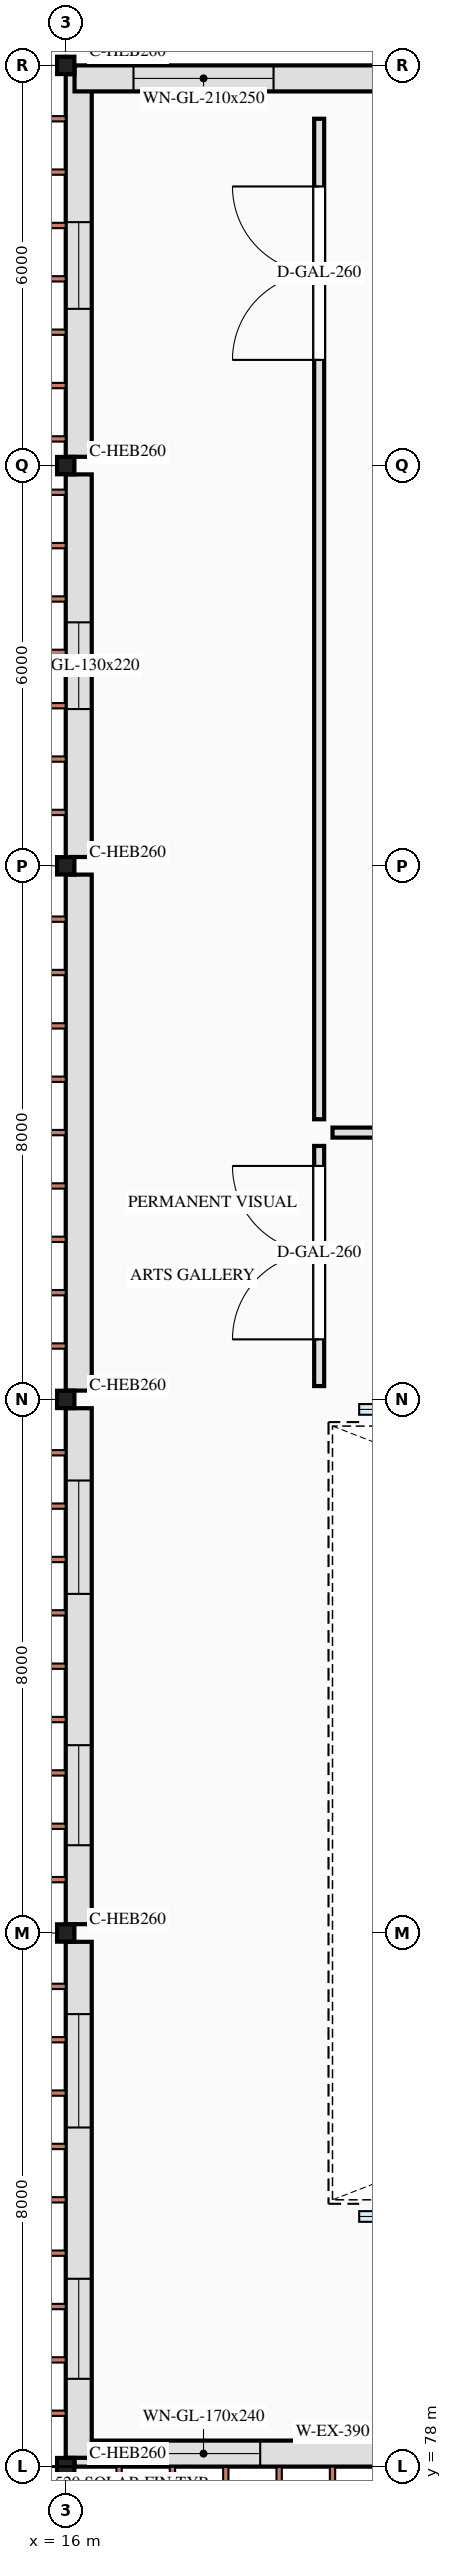
"""IFC4 building model, lengths in metres.
Left out: names, types, materials, properties, quantities, classifications, styles, units other than length and angle.
Written with IfcOpenShell. Run it as: python <this file> out.ifc"""

import sys

from ifc_helpers import new_model, si_unit, direction, frame, frame_2d, origin, origin_2d, place, context, subcontext, project, spatial, rectangle, i_section, extrude, element, fill, save


model = new_model("IFC4")
c1 = context("Model", 3, precision=1e-05, world=origin(), true_north=direction((0.0, 1.0)))
c2 = subcontext(c1, "Body", "Model", "MODEL_VIEW")
j1 = project(units=[si_unit("LENGTHUNIT", "METRE"), si_unit("PLANEANGLEUNIT", "RADIAN")], contexts=[c1])
p1 = place(None, origin())
s1 = spatial("IfcSite", under=j1, at=p1, CompositionType="ELEMENT")
p2 = place(p1, origin())
s2 = spatial("IfcBuilding", under=s1, at=p2, CompositionType="ELEMENT")
p3 = place(p2, frame((0.0, 0.0, 9.6)))
s3 = spatial("IfcBuildingStorey", under=s2, at=p3, CompositionType="ELEMENT", Elevation=9.6)
for number, where, z_axis, x_axis in (
    (1, (16.0, 78.0, 0.0), (0.0, 0.0, 1.0), (1.0, 0.0, 0.0)),
    (2, (16.0, 86.0, 0.0), (0.0, 0.0, 1.0), (1.0, 0.0, 0.0)),
    (3, (16.0, 94.0, 0.0), (0.0, 0.0, 1.0), (1.0, 0.0, 0.0)),
    (4, (16.0, 102.0, 0.0), (0.0, 0.0, 1.0), (1.0, 0.0, 0.0)),
    (5, (16.0, 108.0, 0.0), (0.0, 0.0, 1.0), (1.0, 0.0, 0.0)),
    (6, (16.0, 114.0, 0.0), (0.0, 0.0, 1.0), (1.0, 0.0, 0.0)),
):
    element("IfcColumn", number, at=place(p3, frame(where, z_axis=z_axis, x_axis=x_axis)), inside=s3, PredefinedType="COLUMN", context=c2, shape_type="SweptSolid", body=[
        extrude(i_section(OverallWidth=0.26, OverallDepth=0.26, WebThickness=0.01, FlangeThickness=0.018, FilletRadius=0.024, at=origin_2d()), origin(), (0.0, 0.0, 1.0), 8.0),
    ])
p4 = place(p3, frame((23.868, 78.195, 0.0), z_axis=(0.0, 0.0, 1.0), x_axis=(-1.0, 0.0, 0.0)))
e7 = element("IfcWall", 7, at=p4, inside=s3, PredefinedType="SOLIDWALL", context=c2, shape_type="SweptSolid", body=[
    extrude(rectangle(XDim=7.736, YDim=0.39, at=frame_2d((3.868, 0.0))), origin(), (0.0, 0.0, 1.0), 7.305),
])
p5 = place(p4, frame((1.184, 0.0, 0.85)))
e8 = element("IfcOpeningElement", 8, at=p5, cuts=e7, PredefinedType="OPENING", context=c2, shape_type="SweptSolid", body=[
    extrude(rectangle(XDim=1.5, YDim=2.4, at=frame_2d((0.75, 1.2))), frame((0.0, 0.205, 0.0), z_axis=(0.0, -1.0, 0.0), x_axis=(1.0, 0.0, 0.0)), (0.0, 0.0, 1.0), 0.41),
])
p6 = place(p4, frame((4.952, 0.0, 0.85)))
e9 = element("IfcOpeningElement", 9, at=p6, cuts=e7, PredefinedType="OPENING", context=c2, shape_type="SweptSolid", body=[
    extrude(rectangle(XDim=1.7, YDim=2.4, at=frame_2d((0.85, 1.2))), frame((0.0, 0.205, 0.0), z_axis=(0.0, -1.0, 0.0), x_axis=(1.0, 0.0, 0.0)), (0.0, 0.0, 1.0), 0.41),
])
p7 = place(p3, frame((16.195, 78.132, 0.0), z_axis=(0.0, 0.0, 1.0), x_axis=(0.0, 1.0, 0.0)))
e10 = element("IfcWall", 10, at=p7, inside=s3, PredefinedType="SOLIDWALL", context=c2, shape_type="SweptSolid", body=[
    extrude(rectangle(XDim=7.736, YDim=0.39, at=frame_2d((3.868, 0.0))), origin(), (0.0, 0.0, 1.0), 7.305),
])
p8 = place(p7, frame((1.184, 0.0, 0.85)))
e11 = element("IfcOpeningElement", 11, at=p8, cuts=e10, PredefinedType="OPENING", context=c2, shape_type="SweptSolid", body=[
    extrude(rectangle(XDim=1.5, YDim=2.4, at=frame_2d((0.75, 1.2))), frame((0.0, 0.205, 0.0), z_axis=(0.0, -1.0, 0.0), x_axis=(1.0, 0.0, 0.0)), (0.0, 0.0, 1.0), 0.41),
])
p9 = place(p7, frame((4.952, 0.0, 0.85)))
e12 = element("IfcOpeningElement", 12, at=p9, cuts=e10, PredefinedType="OPENING", context=c2, shape_type="SweptSolid", body=[
    extrude(rectangle(XDim=1.7, YDim=2.4, at=frame_2d((0.85, 1.2))), frame((0.0, 0.205, 0.0), z_axis=(0.0, -1.0, 0.0), x_axis=(1.0, 0.0, 0.0)), (0.0, 0.0, 1.0), 0.41),
])
p10 = place(p3, frame((16.195, 86.132, 0.0), z_axis=(0.0, 0.0, 1.0), x_axis=(0.0, 1.0, 0.0)))
e13 = element("IfcWall", 13, at=p10, inside=s3, PredefinedType="SOLIDWALL", context=c2, shape_type="SweptSolid", body=[
    extrude(rectangle(XDim=7.736, YDim=0.39, at=frame_2d((3.868, 0.0))), origin(), (0.0, 0.0, 1.0), 7.305),
])
p11 = place(p10, frame((1.184, 0.0, 0.85)))
e14 = element("IfcOpeningElement", 14, at=p11, cuts=e13, PredefinedType="OPENING", context=c2, shape_type="SweptSolid", body=[
    extrude(rectangle(XDim=1.5, YDim=2.4, at=frame_2d((0.75, 1.2))), frame((0.0, 0.205, 0.0), z_axis=(0.0, -1.0, 0.0), x_axis=(1.0, 0.0, 0.0)), (0.0, 0.0, 1.0), 0.41),
])
p12 = place(p10, frame((4.952, 0.0, 0.85)))
e15 = element("IfcOpeningElement", 15, at=p12, cuts=e13, PredefinedType="OPENING", context=c2, shape_type="SweptSolid", body=[
    extrude(rectangle(XDim=1.7, YDim=2.4, at=frame_2d((0.85, 1.2))), frame((0.0, 0.205, 0.0), z_axis=(0.0, -1.0, 0.0), x_axis=(1.0, 0.0, 0.0)), (0.0, 0.0, 1.0), 0.41),
])
p13 = place(p3, frame((16.195, 94.132, 0.0), z_axis=(0.0, 0.0, 1.0), x_axis=(0.0, 1.0, 0.0)))
e16 = element("IfcWall", 16, at=p13, inside=s3, PredefinedType="SOLIDWALL", context=c2, shape_type="SweptSolid", body=[
    extrude(rectangle(XDim=7.736, YDim=0.39, at=frame_2d((3.868, 0.0))), origin(), (0.0, 0.0, 1.0), 7.305),
])
p14 = place(p3, frame((16.195, 102.132, 0.0), z_axis=(0.0, 0.0, 1.0), x_axis=(0.0, 1.0, 0.0)))
e17 = element("IfcWall", 17, at=p14, inside=s3, PredefinedType="SOLIDWALL", context=c2, shape_type="SweptSolid", body=[
    extrude(rectangle(XDim=5.736, YDim=0.39, at=frame_2d((2.868, 0.0))), origin(), (0.0, 0.0, 1.0), 7.305),
])
p15 = place(p14, frame((2.218, 0.0, 0.85)))
e18 = element("IfcOpeningElement", 18, at=p15, cuts=e17, PredefinedType="OPENING", context=c2, shape_type="SweptSolid", body=[
    extrude(rectangle(XDim=1.3, YDim=2.2, at=frame_2d((0.65, 1.1))), frame((0.0, 0.205, 0.0), z_axis=(0.0, -1.0, 0.0), x_axis=(1.0, 0.0, 0.0)), (0.0, 0.0, 1.0), 0.41),
])
p16 = place(p3, frame((16.195, 108.132, 0.0), z_axis=(0.0, 0.0, 1.0), x_axis=(0.0, 1.0, 0.0)))
e19 = element("IfcWall", 19, at=p16, inside=s3, PredefinedType="SOLIDWALL", context=c2, shape_type="SweptSolid", body=[
    extrude(rectangle(XDim=5.736, YDim=0.39, at=frame_2d((2.868, 0.0))), origin(), (0.0, 0.0, 1.0), 7.305),
])
p17 = place(p16, frame((2.218, 0.0, 0.85)))
e20 = element("IfcOpeningElement", 20, at=p17, cuts=e19, PredefinedType="OPENING", context=c2, shape_type="SweptSolid", body=[
    extrude(rectangle(XDim=1.3, YDim=2.2, at=frame_2d((0.65, 1.1))), frame((0.0, 0.205, 0.0), z_axis=(0.0, -1.0, 0.0), x_axis=(1.0, 0.0, 0.0)), (0.0, 0.0, 1.0), 0.41),
])
p18 = place(p3, frame((16.132, 113.805, 0.0), z_axis=(0.0, 0.0, 1.0), x_axis=(1.0, 0.0, 0.0)))
e21 = element("IfcWall", 21, at=p18, inside=s3, PredefinedType="SOLIDWALL", context=c2, shape_type="SweptSolid", body=[
    extrude(rectangle(XDim=7.736, YDim=0.39, at=frame_2d((3.868, 0.0))), origin(), (0.0, 0.0, 1.0), 7.305),
])
p19 = place(p18, frame((0.884, 0.0, 0.85)))
e22 = element("IfcOpeningElement", 22, at=p19, cuts=e21, PredefinedType="OPENING", context=c2, shape_type="SweptSolid", body=[
    extrude(rectangle(XDim=2.1, YDim=2.5, at=frame_2d((1.05, 1.25))), frame((0.0, 0.205, 0.0), z_axis=(0.0, -1.0, 0.0), x_axis=(1.0, 0.0, 0.0)), (0.0, 0.0, 1.0), 0.41),
])
p20 = place(p18, frame((4.602, 0.0, 0.85)))
e23 = element("IfcOpeningElement", 23, at=p20, cuts=e21, PredefinedType="OPENING", context=c2, shape_type="SweptSolid", body=[
    extrude(rectangle(XDim=2.4, YDim=2.6, at=frame_2d((1.2, 1.3))), frame((0.0, 0.205, 0.0), z_axis=(0.0, -1.0, 0.0), x_axis=(1.0, 0.0, 0.0)), (0.0, 0.0, 1.0), 0.41),
])
p21 = place(p3, frame((19.8, 94.2, 0.0), z_axis=(0.0, 0.0, 1.0), x_axis=(0.0, 1.0, 0.0)))
e24 = element("IfcWall", 24, at=p21, inside=s3, PredefinedType="PARTITIONING", context=c2, shape_type="SweptSolid", body=[
    extrude(rectangle(XDim=3.6, YDim=0.15, at=frame_2d((1.8, 0.0))), origin(), (0.0, 0.0, 1.0), 7.76),
])
p22 = place(p21, frame((0.7, 0.0, 0.0)))
e25 = element("IfcOpeningElement", 25, at=p22, cuts=e24, PredefinedType="OPENING", context=c2, shape_type="SweptSolid", body=[
    extrude(rectangle(XDim=2.6, YDim=2.9, at=frame_2d((1.3, 1.45))), frame((0.0, 0.085, 0.0), z_axis=(0.0, -1.0, 0.0), x_axis=(1.0, 0.0, 0.0)), (0.0, 0.0, 1.0), 0.17),
])
p23 = place(p3, frame((20.0, 98.0, 0.0), z_axis=(0.0, 0.0, 1.0), x_axis=(1.0, 0.0, 0.0)))
e26 = element("IfcWall", 26, at=p23, inside=s3, PredefinedType="PARTITIONING", context=c2, shape_type="SweptSolid", body=[
    extrude(rectangle(XDim=20.8, YDim=0.15, at=frame_2d((10.4, 0.0))), origin(), (0.0, 0.0, 1.0), 7.76),
])
p24 = place(p23, frame((6.708, 0.0, 0.0)))
e27 = element("IfcOpeningElement", 27, at=p24, cuts=e26, PredefinedType="OPENING", context=c2, shape_type="SweptSolid", body=[
    extrude(rectangle(XDim=2.4, YDim=2.75, at=frame_2d((1.2, 1.375))), frame((0.0, 0.085, 0.0), z_axis=(0.0, -1.0, 0.0), x_axis=(1.0, 0.0, 0.0)), (0.0, 0.0, 1.0), 0.17),
])
p25 = place(p3, frame((19.8, 98.2, 0.0), z_axis=(0.0, 0.0, 1.0), x_axis=(0.0, 1.0, 0.0)))
e28 = element("IfcWall", 28, at=p25, inside=s3, PredefinedType="PARTITIONING", context=c2, shape_type="SweptSolid", body=[
    extrude(rectangle(XDim=15.0, YDim=0.15, at=frame_2d((7.5, 0.0))), origin(), (0.0, 0.0, 1.0), 7.76),
])
p26 = place(p25, frame((11.385, 0.0, 0.0)))
e29 = element("IfcOpeningElement", 29, at=p26, cuts=e28, PredefinedType="OPENING", context=c2, shape_type="SweptSolid", body=[
    extrude(rectangle(XDim=2.6, YDim=2.9, at=frame_2d((1.3, 1.45))), frame((0.0, 0.085, 0.0), z_axis=(0.0, -1.0, 0.0), x_axis=(1.0, 0.0, 0.0)), (0.0, 0.0, 1.0), 0.17),
])
p27 = place(p6, origin())
e30 = element("IfcWindow", 30, at=p27, inside=s3, PartitioningType="DOUBLE_PANEL_VERTICAL", PredefinedType="WINDOW", context=c2, shape_type="SweptSolid", body=[
    extrude(rectangle(XDim=1.7, YDim=2.4, at=frame_2d((0.85, 1.2))), frame((0.0, 0.03, 0.0), z_axis=(0.0, -1.0, 0.0), x_axis=(1.0, 0.0, 0.0)), (0.0, 0.0, 1.0), 0.06),
])
fill(e9, e30)
p28 = place(p8, origin())
e31 = element("IfcWindow", 31, at=p28, inside=s3, PartitioningType="SINGLE_PANEL", PredefinedType="WINDOW", context=c2, shape_type="SweptSolid", body=[
    extrude(rectangle(XDim=1.5, YDim=2.4, at=frame_2d((0.75, 1.2))), frame((0.0, 0.03, 0.0), z_axis=(0.0, -1.0, 0.0), x_axis=(1.0, 0.0, 0.0)), (0.0, 0.0, 1.0), 0.06),
])
fill(e11, e31)
p29 = place(p9, origin())
e32 = element("IfcWindow", 32, at=p29, inside=s3, PartitioningType="DOUBLE_PANEL_VERTICAL", PredefinedType="WINDOW", context=c2, shape_type="SweptSolid", body=[
    extrude(rectangle(XDim=1.7, YDim=2.4, at=frame_2d((0.85, 1.2))), frame((0.0, 0.03, 0.0), z_axis=(0.0, -1.0, 0.0), x_axis=(1.0, 0.0, 0.0)), (0.0, 0.0, 1.0), 0.06),
])
fill(e12, e32)
p30 = place(p11, origin())
e33 = element("IfcWindow", 33, at=p30, inside=s3, PartitioningType="SINGLE_PANEL", PredefinedType="WINDOW", context=c2, shape_type="SweptSolid", body=[
    extrude(rectangle(XDim=1.5, YDim=2.4, at=frame_2d((0.75, 1.2))), frame((0.0, 0.03, 0.0), z_axis=(0.0, -1.0, 0.0), x_axis=(1.0, 0.0, 0.0)), (0.0, 0.0, 1.0), 0.06),
])
fill(e14, e33)
p31 = place(p12, origin())
e34 = element("IfcWindow", 34, at=p31, inside=s3, PartitioningType="DOUBLE_PANEL_VERTICAL", PredefinedType="WINDOW", context=c2, shape_type="SweptSolid", body=[
    extrude(rectangle(XDim=1.7, YDim=2.4, at=frame_2d((0.85, 1.2))), frame((0.0, 0.03, 0.0), z_axis=(0.0, -1.0, 0.0), x_axis=(1.0, 0.0, 0.0)), (0.0, 0.0, 1.0), 0.06),
])
fill(e15, e34)
p32 = place(p15, origin())
e35 = element("IfcWindow", 35, at=p32, inside=s3, PartitioningType="SINGLE_PANEL", PredefinedType="WINDOW", context=c2, shape_type="SweptSolid", body=[
    extrude(rectangle(XDim=1.3, YDim=2.2, at=frame_2d((0.65, 1.1))), frame((0.0, 0.03, 0.0), z_axis=(0.0, -1.0, 0.0), x_axis=(1.0, 0.0, 0.0)), (0.0, 0.0, 1.0), 0.06),
])
fill(e18, e35)
p33 = place(p17, origin())
e36 = element("IfcWindow", 36, at=p33, inside=s3, PartitioningType="SINGLE_PANEL", PredefinedType="WINDOW", context=c2, shape_type="SweptSolid", body=[
    extrude(rectangle(XDim=1.3, YDim=2.2, at=frame_2d((0.65, 1.1))), frame((0.0, 0.03, 0.0), z_axis=(0.0, -1.0, 0.0), x_axis=(1.0, 0.0, 0.0)), (0.0, 0.0, 1.0), 0.06),
])
fill(e20, e36)
p34 = place(p19, origin())
e37 = element("IfcWindow", 37, at=p34, inside=s3, PartitioningType="DOUBLE_PANEL_VERTICAL", PredefinedType="WINDOW", context=c2, shape_type="SweptSolid", body=[
    extrude(rectangle(XDim=2.1, YDim=2.5, at=frame_2d((1.05, 1.25))), frame((0.0, 0.03, 0.0), z_axis=(0.0, -1.0, 0.0), x_axis=(1.0, 0.0, 0.0)), (0.0, 0.0, 1.0), 0.06),
])
fill(e22, e37)
p35 = place(p22, origin())
e38 = element("IfcDoor", 38, at=p35, inside=s3, OperationType="DOUBLE_DOOR_DOUBLE_SWING", PredefinedType="DOOR", context=c2, shape_type="SweptSolid", body=[
    extrude(rectangle(XDim=2.6, YDim=2.9, at=frame_2d((1.3, 1.45))), frame((0.0, 0.025, 0.0), z_axis=(0.0, -1.0, 0.0), x_axis=(1.0, 0.0, 0.0)), (0.0, 0.0, 1.0), 0.05),
])
fill(e25, e38)
p36 = place(p26, origin())
e39 = element("IfcDoor", 39, at=p36, inside=s3, OperationType="DOUBLE_DOOR_DOUBLE_SWING", PredefinedType="DOOR", context=c2, shape_type="SweptSolid", body=[
    extrude(rectangle(XDim=2.6, YDim=2.9, at=frame_2d((1.3, 1.45))), frame((0.0, 0.025, 0.0), z_axis=(0.0, -1.0, 0.0), x_axis=(1.0, 0.0, 0.0)), (0.0, 0.0, 1.0), 0.05),
])
fill(e29, e39)
save(model, sys.argv[1])
